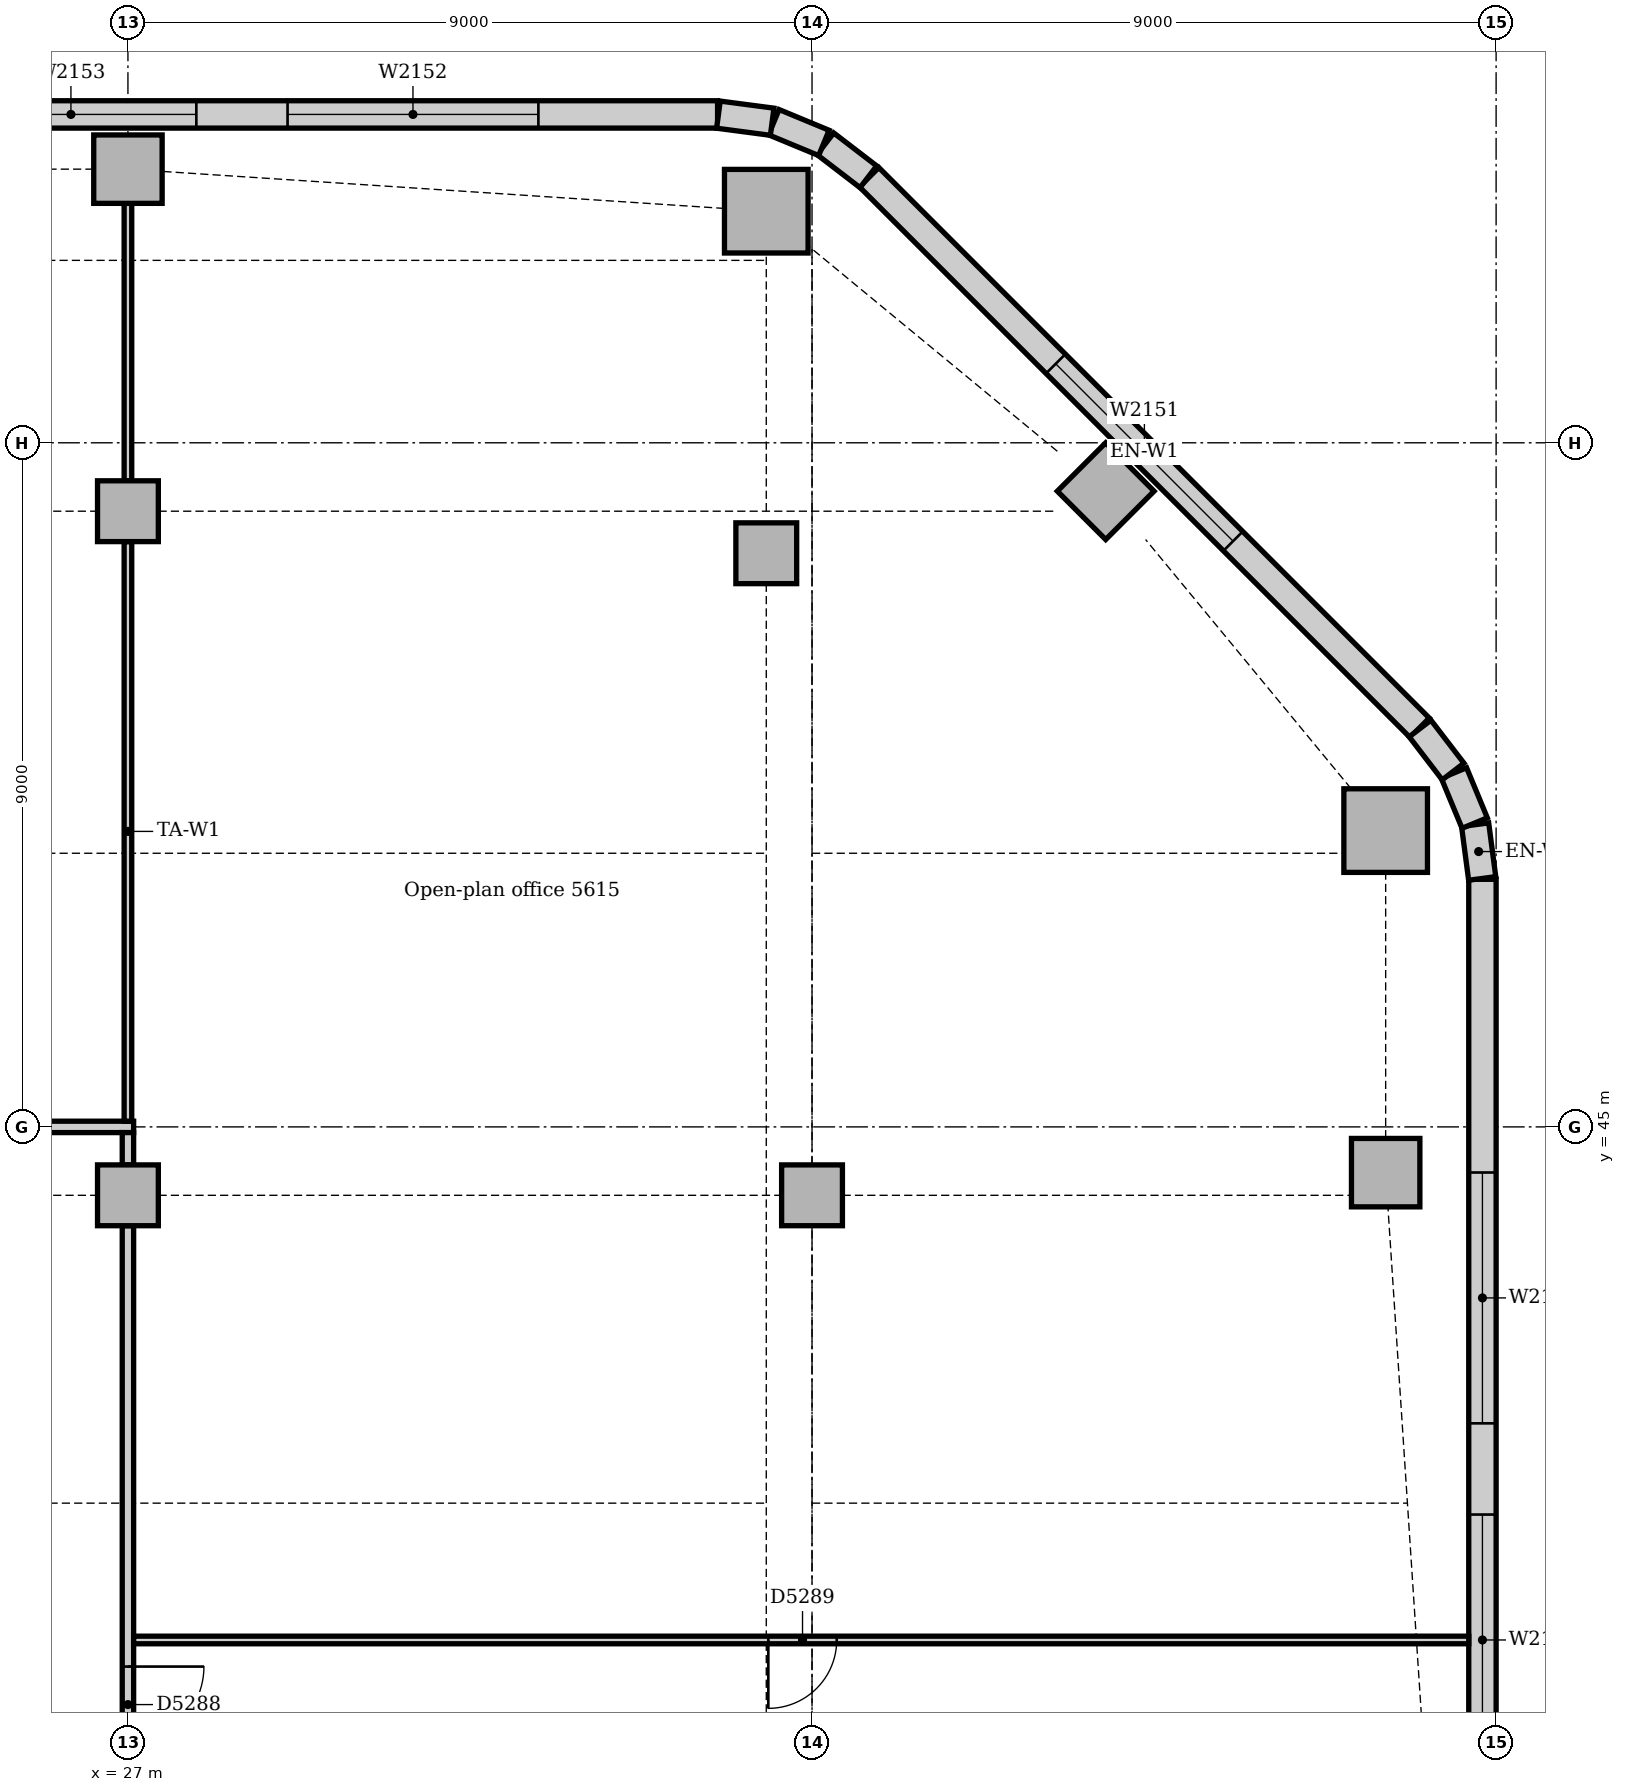
"""IFC4 building model, lengths in metres.
Left out: names, types, materials, properties, quantities, classifications, styles, units other than length and angle.
Written with IfcOpenShell. Run it as: python <this file> out.ifc"""

import sys

from ifc_helpers import new_model, si_unit, direction, frame, frame_2d, origin, origin_2d, place, context, subcontext, project, spatial, rectangle, extrude, element, fill, save


model = new_model("IFC4")
c1 = context("Model", 3, precision=1e-05, world=origin(), true_north=direction((0.0, 1.0)))
c2 = subcontext(c1, "Body", "Model", "MODEL_VIEW")
j1 = project(units=[si_unit("LENGTHUNIT", "METRE"), si_unit("PLANEANGLEUNIT", "RADIAN")], contexts=[c1])
p1 = place(None, origin())
s1 = spatial("IfcSite", under=j1, at=p1, CompositionType="ELEMENT")
p2 = place(p1, origin())
s2 = spatial("IfcBuilding", under=s1, at=p2, CompositionType="ELEMENT")
p3 = place(p2, frame((0.0, 0.0, 234.0)))
s3 = spatial("IfcBuildingStorey", under=s2, at=p3, CompositionType="ELEMENT", Elevation=234.0)
for number, where, z_axis, x_axis in (
    (1, (43.547, 48.898, 0.0), (0.0, 0.0, 1.0), (1.0, 0.0, 0.0)),
    (2, (35.398, 57.047, 0.0), (0.0, 0.0, 1.0), (1.0, 0.0, 0.0)),
):
    element("IfcColumn", number, at=place(p3, frame(where, z_axis=z_axis, x_axis=x_axis)), inside=s3, PredefinedType="COLUMN", context=c2, shape_type="SweptSolid", body=[
        extrude(rectangle(XDim=1.1, YDim=1.1, at=origin_2d()), origin(), (0.0, 0.0, 1.0), 3.85),
    ])
for number, where, z_axis, x_axis in (
    (3, (43.547, 44.398, 0.0), (0.0, 0.0, 1.0), (1.0, 0.0, 0.0)),
    (4, (39.864, 53.364, 0.0), (0.0, 0.0, 1.0), (0.707, 0.707, 0.0)),
    (5, (27.0, 57.6, 0.0), (0.0, 0.0, 1.0), (1.0, 0.0, 0.0)),
):
    element("IfcColumn", number, at=place(p3, frame(where, z_axis=z_axis, x_axis=x_axis)), inside=s3, PredefinedType="COLUMN", context=c2, shape_type="SweptSolid", body=[
        extrude(rectangle(XDim=0.9, YDim=0.9, at=origin_2d()), origin(), (0.0, 0.0, 1.0), 3.85),
    ])
for number, where, z_axis, x_axis in (
    (6, (27.0, 44.1, 0.0), (0.0, 0.0, 1.0), (1.0, 0.0, 0.0)),
    (7, (27.0, 53.1, 0.0), (0.0, 0.0, 1.0), (1.0, 0.0, 0.0)),
    (8, (36.0, 44.1, 0.0), (0.0, 0.0, 1.0), (1.0, 0.0, 0.0)),
    (9, (35.398, 52.547, 0.0), (0.0, 0.0, 1.0), (1.0, 0.0, 0.0)),
):
    element("IfcColumn", number, at=place(p3, frame(where, z_axis=z_axis, x_axis=x_axis)), inside=s3, PredefinedType="COLUMN", context=c2, shape_type="SweptSolid", body=[
        extrude(rectangle(XDim=0.8, YDim=0.8, at=origin_2d()), origin(), (0.0, 0.0, 1.0), 3.85),
    ])
p4 = place(p3, frame((44.82, 23.743, 0.0), z_axis=(0.0, 0.0, 1.0), x_axis=(0.0, 1.0, 0.0)))
e10 = element("IfcWall", 10, at=p4, inside=s3, PredefinedType="STANDARD", context=c2, shape_type="SweptSolid", body=[
    extrude(rectangle(XDim=24.515, YDim=0.36, at=frame_2d((12.257, 0.0))), origin(), (0.0, 0.0, 1.0), 3.85),
])
p5 = place(p4, frame((3.857, 0.0, 0.9)))
e11 = element("IfcOpeningElement", 11, at=p5, cuts=e10, PredefinedType="OPENING", context=c2, shape_type="SweptSolid", body=[
    extrude(rectangle(XDim=3.3, YDim=1.6, at=frame_2d((1.65, 0.8))), frame((0.0, 0.19, 0.0), z_axis=(0.0, -1.0, 0.0), x_axis=(1.0, 0.0, 0.0)), (0.0, 0.0, 1.0), 0.38),
])
p6 = place(p4, frame((8.357, 0.0, 0.9)))
e12 = element("IfcOpeningElement", 12, at=p6, cuts=e10, PredefinedType="OPENING", context=c2, shape_type="SweptSolid", body=[
    extrude(rectangle(XDim=3.3, YDim=1.6, at=frame_2d((1.65, 0.8))), frame((0.0, 0.19, 0.0), z_axis=(0.0, -1.0, 0.0), x_axis=(1.0, 0.0, 0.0)), (0.0, 0.0, 1.0), 0.38),
])
p7 = place(p4, frame((12.857, 0.0, 0.9)))
e13 = element("IfcOpeningElement", 13, at=p7, cuts=e10, PredefinedType="OPENING", context=c2, shape_type="SweptSolid", body=[
    extrude(rectangle(XDim=3.3, YDim=1.6, at=frame_2d((1.65, 0.8))), frame((0.0, 0.19, 0.0), z_axis=(0.0, -1.0, 0.0), x_axis=(1.0, 0.0, 0.0)), (0.0, 0.0, 1.0), 0.38),
])
p8 = place(p4, frame((17.357, 0.0, 0.9)))
e14 = element("IfcOpeningElement", 14, at=p8, cuts=e10, PredefinedType="OPENING", context=c2, shape_type="SweptSolid", body=[
    extrude(rectangle(XDim=3.3, YDim=1.6, at=frame_2d((1.65, 0.8))), frame((0.0, 0.19, 0.0), z_axis=(0.0, -1.0, 0.0), x_axis=(1.0, 0.0, 0.0)), (0.0, 0.0, 1.0), 0.38),
])
p9 = place(p3, frame((43.994, 50.251, 0.0), z_axis=(0.0, 0.0, 1.0), x_axis=(-0.707106781187, 0.707106781187, 0.0)))
e15 = element("IfcWall", 15, at=p9, inside=s3, PredefinedType="STANDARD", context=c2, shape_type="SweptSolid", body=[
    extrude(rectangle(XDim=10.243, YDim=0.36, at=frame_2d((5.121, 0.0))), origin(), (0.0, 0.0, 1.0), 3.85),
])
p10 = place(p9, frame((3.471, 0.0, 0.9)))
e16 = element("IfcOpeningElement", 16, at=p10, cuts=e15, PredefinedType="OPENING", context=c2, shape_type="SweptSolid", body=[
    extrude(rectangle(XDim=3.3, YDim=1.6, at=frame_2d((1.65, 0.8))), frame((0.0, 0.19, 0.0), z_axis=(0.0, -1.0, 0.0), x_axis=(1.0, 0.0, 0.0)), (0.0, 0.0, 1.0), 0.38),
])
p11 = place(p3, frame((34.757, 58.32, 0.0), z_axis=(0.0, 0.0, 1.0), x_axis=(-1.0, 0.0, 0.0)))
e17 = element("IfcWall", 17, at=p11, inside=s3, PredefinedType="STANDARD", context=c2, shape_type="SweptSolid", body=[
    extrude(rectangle(XDim=30.515, YDim=0.36, at=frame_2d((15.257, 0.0))), origin(), (0.0, 0.0, 1.0), 3.85),
])
p12 = place(p11, frame((2.357, 0.0, 0.9)))
e18 = element("IfcOpeningElement", 18, at=p12, cuts=e17, PredefinedType="OPENING", context=c2, shape_type="SweptSolid", body=[
    extrude(rectangle(XDim=3.3, YDim=1.6, at=frame_2d((1.65, 0.8))), frame((0.0, 0.19, 0.0), z_axis=(0.0, -1.0, 0.0), x_axis=(1.0, 0.0, 0.0)), (0.0, 0.0, 1.0), 0.38),
])
p13 = place(p11, frame((6.857, 0.0, 0.9)))
e19 = element("IfcOpeningElement", 19, at=p13, cuts=e17, PredefinedType="OPENING", context=c2, shape_type="SweptSolid", body=[
    extrude(rectangle(XDim=3.3, YDim=1.6, at=frame_2d((1.65, 0.8))), frame((0.0, 0.19, 0.0), z_axis=(0.0, -1.0, 0.0), x_axis=(1.0, 0.0, 0.0)), (0.0, 0.0, 1.0), 0.38),
])
p14 = place(p11, frame((11.357, 0.0, 0.9)))
e20 = element("IfcOpeningElement", 20, at=p14, cuts=e17, PredefinedType="OPENING", context=c2, shape_type="SweptSolid", body=[
    extrude(rectangle(XDim=3.3, YDim=1.6, at=frame_2d((1.65, 0.8))), frame((0.0, 0.19, 0.0), z_axis=(0.0, -1.0, 0.0), x_axis=(1.0, 0.0, 0.0)), (0.0, 0.0, 1.0), 0.38),
])
p15 = place(p11, frame((15.857, 0.0, 0.9)))
e21 = element("IfcOpeningElement", 21, at=p15, cuts=e17, PredefinedType="OPENING", context=c2, shape_type="SweptSolid", body=[
    extrude(rectangle(XDim=3.3, YDim=1.6, at=frame_2d((1.65, 0.8))), frame((0.0, 0.19, 0.0), z_axis=(0.0, -1.0, 0.0), x_axis=(1.0, 0.0, 0.0)), (0.0, 0.0, 1.0), 0.38),
])
p16 = place(p11, frame((20.357, 0.0, 0.9)))
e22 = element("IfcOpeningElement", 22, at=p16, cuts=e17, PredefinedType="OPENING", context=c2, shape_type="SweptSolid", body=[
    extrude(rectangle(XDim=3.3, YDim=1.6, at=frame_2d((1.65, 0.8))), frame((0.0, 0.19, 0.0), z_axis=(0.0, -1.0, 0.0), x_axis=(1.0, 0.0, 0.0)), (0.0, 0.0, 1.0), 0.38),
])
p17 = place(p11, frame((24.857, 0.0, 0.9)))
e23 = element("IfcOpeningElement", 23, at=p17, cuts=e17, PredefinedType="OPENING", context=c2, shape_type="SweptSolid", body=[
    extrude(rectangle(XDim=3.3, YDim=1.6, at=frame_2d((1.65, 0.8))), frame((0.0, 0.19, 0.0), z_axis=(0.0, -1.0, 0.0), x_axis=(1.0, 0.0, 0.0)), (0.0, 0.0, 1.0), 0.38),
])
for number, where, z_axis, x_axis in (
    (24, (44.817, 48.269, 0.0), (0.0, 0.0, 1.0), (-0.131, 0.991, 0.0)),
    (25, (44.718, 48.997, 0.0), (0.0, 0.0, 1.0), (-0.383, 0.924, 0.0)),
):
    element("IfcWall", number, at=place(p3, frame(where, z_axis=z_axis, x_axis=x_axis)), inside=s3, PredefinedType="STANDARD", context=c2, shape_type="SweptSolid", body=[
        extrude(rectangle(XDim=0.713, YDim=0.36, at=frame_2d((0.356, 0.0))), origin(), (0.0, 0.0, 1.0), 3.85),
    ])
for number, where, z_axis, x_axis in (
    (26, (44.434, 49.675, 0.0), (0.0, 0.0, 1.0), (-0.609, 0.793, 0.0)),
    (27, (36.741, 57.5, 0.0), (0.0, 0.0, 1.0), (-0.793, 0.609, 0.0)),
):
    element("IfcWall", number, at=place(p3, frame(where, z_axis=z_axis, x_axis=x_axis)), inside=s3, PredefinedType="STANDARD", context=c2, shape_type="SweptSolid", body=[
        extrude(rectangle(XDim=0.713, YDim=0.36, at=frame_2d((0.357, 0.0))), origin(), (0.0, 0.0, 1.0), 3.85),
    ])
for number, where, z_axis, x_axis in (
    (28, (36.156, 57.945, 0.0), (0.0, 0.0, 1.0), (-0.924, 0.383, 0.0)),
    (29, (35.476, 58.224, 0.0), (0.0, 0.0, 1.0), (-0.991, 0.131, 0.0)),
):
    element("IfcWall", number, at=place(p3, frame(where, z_axis=z_axis, x_axis=x_axis)), inside=s3, PredefinedType="STANDARD", context=c2, shape_type="SweptSolid", body=[
        extrude(rectangle(XDim=0.713, YDim=0.36, at=frame_2d((0.356, 0.0))), origin(), (0.0, 0.0, 1.0), 3.85),
    ])
p18 = place(p3, frame((0.36, 45.0, 0.0), z_axis=(0.0, 0.0, 1.0), x_axis=(1.0, 0.0, 0.0)))
e30 = element("IfcWall", 30, at=p18, inside=s3, PredefinedType="PARTITIONING", context=c2, shape_type="SweptSolid", body=[
    extrude(rectangle(XDim=26.715, YDim=0.15, at=frame_2d((13.357, 0.0))), origin(), (0.0, 0.0, 1.0), 3.85),
])
p19 = place(p18, frame((3.9, 0.0, 0.0)))
e31 = element("IfcOpeningElement", 31, at=p19, cuts=e30, PredefinedType="OPENING", context=c2, shape_type="SweptSolid", body=[
    extrude(rectangle(XDim=1.0, YDim=2.1, at=frame_2d((0.5, 1.05))), frame((0.0, 0.085, 0.0), z_axis=(0.0, -1.0, 0.0), x_axis=(1.0, 0.0, 0.0)), (0.0, 0.0, 1.0), 0.17),
])
p20 = place(p18, frame((16.34, 0.0, 0.0)))
e32 = element("IfcOpeningElement", 32, at=p20, cuts=e30, PredefinedType="OPENING", context=c2, shape_type="SweptSolid", body=[
    extrude(rectangle(XDim=0.9, YDim=2.1, at=frame_2d((0.45, 1.05))), frame((0.0, 0.085, 0.0), z_axis=(0.0, -1.0, 0.0), x_axis=(1.0, 0.0, 0.0)), (0.0, 0.0, 1.0), 0.17),
])
p21 = place(p3, frame((27.0, 36.4, 0.0), z_axis=(0.0, 0.0, 1.0), x_axis=(0.0, 1.0, 0.0)))
e33 = element("IfcWall", 33, at=p21, inside=s3, PredefinedType="PARTITIONING", context=c2, shape_type="SweptSolid", body=[
    extrude(rectangle(XDim=7.3, YDim=0.15, at=frame_2d((3.65, 0.0))), origin(), (0.0, 0.0, 1.0), 3.35),
])
p22 = place(p21, frame((0.5, 0.0, 0.0)))
e34 = element("IfcOpeningElement", 34, at=p22, cuts=e33, PredefinedType="OPENING", context=c2, shape_type="SweptSolid", body=[
    extrude(rectangle(XDim=1.0, YDim=2.1, at=frame_2d((0.5, 1.05))), frame((0.0, 0.085, 0.0), z_axis=(0.0, -1.0, 0.0), x_axis=(1.0, 0.0, 0.0)), (0.0, 0.0, 1.0), 0.17),
])
p23 = place(p3, frame((27.0, 44.5, 0.0), z_axis=(0.0, 0.0, 1.0), x_axis=(0.0, 1.0, 0.0)))
e35 = element("IfcWall", 35, at=p23, inside=s3, PredefinedType="PARTITIONING", context=c2, shape_type="SweptSolid", body=[
    extrude(rectangle(XDim=0.425, YDim=0.15, at=frame_2d((0.212, 0.0))), origin(), (0.0, 0.0, 1.0), 3.85),
])
p24 = place(p3, frame((27.075, 38.25, 0.0), z_axis=(0.0, 0.0, 1.0), x_axis=(1.0, 0.0, 0.0)))
e36 = element("IfcWall", 36, at=p24, inside=s3, PredefinedType="PARTITIONING", context=c2, shape_type="SweptSolid", body=[
    extrude(rectangle(XDim=17.565, YDim=0.1, at=frame_2d((8.783, 0.0))), origin(), (0.0, 0.0, 1.0), 3.85),
])
p25 = place(p24, frame((8.35, 0.0, 0.0)))
e37 = element("IfcOpeningElement", 37, at=p25, cuts=e36, PredefinedType="OPENING", context=c2, shape_type="SweptSolid", body=[
    extrude(rectangle(XDim=0.9, YDim=2.1, at=frame_2d((0.45, 1.05))), frame((0.0, 0.06, 0.0), z_axis=(0.0, -1.0, 0.0), x_axis=(1.0, 0.0, 0.0)), (0.0, 0.0, 1.0), 0.12),
])
p26 = place(p3, frame((27.0, 45.075, 0.0), z_axis=(0.0, 0.0, 1.0), x_axis=(0.0, 1.0, 0.0)))
e38 = element("IfcWall", 38, at=p26, inside=s3, PredefinedType="PARTITIONING", context=c2, shape_type="SweptSolid", body=[
    extrude(rectangle(XDim=7.625, YDim=0.1, at=frame_2d((3.812, 0.0))), origin(), (0.0, 0.0, 1.0), 3.35),
])
p27 = place(p3, frame((27.0, 53.5, 0.0), z_axis=(0.0, 0.0, 1.0), x_axis=(0.0, 1.0, 0.0)))
e39 = element("IfcWall", 39, at=p27, inside=s3, PredefinedType="PARTITIONING", context=c2, shape_type="SweptSolid", body=[
    extrude(rectangle(XDim=3.65, YDim=0.1, at=frame_2d((1.825, 0.0))), origin(), (0.0, 0.0, 1.0), 3.41),
])
p28 = place(p7, origin())
e40 = element("IfcWindow", 40, at=p28, inside=s3, PartitioningType="SINGLE_PANEL", PredefinedType="WINDOW", context=c2, shape_type="SweptSolid", body=[
    extrude(rectangle(XDim=3.3, YDim=1.6, at=frame_2d((1.65, 0.8))), frame((0.0, 0.13, 0.0), z_axis=(0.0, -1.0, 0.0), x_axis=(1.0, 0.0, 0.0)), (0.0, 0.0, 1.0), 0.06),
])
fill(e13, e40)
p29 = place(p8, origin())
e41 = element("IfcWindow", 41, at=p29, inside=s3, PartitioningType="SINGLE_PANEL", PredefinedType="WINDOW", context=c2, shape_type="SweptSolid", body=[
    extrude(rectangle(XDim=3.3, YDim=1.6, at=frame_2d((1.65, 0.8))), frame((0.0, 0.13, 0.0), z_axis=(0.0, -1.0, 0.0), x_axis=(1.0, 0.0, 0.0)), (0.0, 0.0, 1.0), 0.06),
])
fill(e14, e41)
p30 = place(p10, origin())
e42 = element("IfcWindow", 42, at=p30, inside=s3, PartitioningType="SINGLE_PANEL", PredefinedType="WINDOW", context=c2, shape_type="SweptSolid", body=[
    extrude(rectangle(XDim=3.3, YDim=1.6, at=frame_2d((1.65, 0.8))), frame((0.0, 0.13, 0.0), z_axis=(0.0, -1.0, 0.0), x_axis=(1.0, 0.0, 0.0)), (0.0, 0.0, 1.0), 0.06),
])
fill(e16, e42)
p31 = place(p12, origin())
e43 = element("IfcWindow", 43, at=p31, inside=s3, PartitioningType="SINGLE_PANEL", PredefinedType="WINDOW", context=c2, shape_type="SweptSolid", body=[
    extrude(rectangle(XDim=3.3, YDim=1.6, at=frame_2d((1.65, 0.8))), frame((0.0, 0.13, 0.0), z_axis=(0.0, -1.0, 0.0), x_axis=(1.0, 0.0, 0.0)), (0.0, 0.0, 1.0), 0.06),
])
fill(e18, e43)
p32 = place(p13, origin())
e44 = element("IfcWindow", 44, at=p32, inside=s3, PartitioningType="SINGLE_PANEL", PredefinedType="WINDOW", context=c2, shape_type="SweptSolid", body=[
    extrude(rectangle(XDim=3.3, YDim=1.6, at=frame_2d((1.65, 0.8))), frame((0.0, 0.13, 0.0), z_axis=(0.0, -1.0, 0.0), x_axis=(1.0, 0.0, 0.0)), (0.0, 0.0, 1.0), 0.06),
])
fill(e19, e44)
p33 = place(p22, frame((1.0, 0.0, 0.0), z_axis=(0.0, 0.0, 1.0), x_axis=(-1.0, 0.0, 0.0)))
e45 = element("IfcDoor", 45, at=p33, inside=s3, OperationType="SINGLE_SWING_LEFT", PredefinedType="DOOR", context=c2, shape_type="SweptSolid", body=[
    extrude(rectangle(XDim=1.0, YDim=2.1, at=frame_2d((0.5, 1.05))), frame((0.0, 0.025, 0.0), z_axis=(0.0, -1.0, 0.0), x_axis=(1.0, 0.0, 0.0)), (0.0, 0.0, 1.0), 0.05),
])
fill(e34, e45)
p34 = place(p25, frame((0.9, 0.0, 0.0), z_axis=(0.0, 0.0, 1.0), x_axis=(-1.0, 0.0, 0.0)))
e46 = element("IfcDoor", 46, at=p34, inside=s3, OperationType="SINGLE_SWING_RIGHT", PredefinedType="DOOR", context=c2, shape_type="SweptSolid", body=[
    extrude(rectangle(XDim=0.9, YDim=2.1, at=frame_2d((0.45, 1.05))), frame((0.0, 0.025, 0.0), z_axis=(0.0, -1.0, 0.0), x_axis=(1.0, 0.0, 0.0)), (0.0, 0.0, 1.0), 0.05),
])
fill(e37, e46)
save(model, sys.argv[1])
